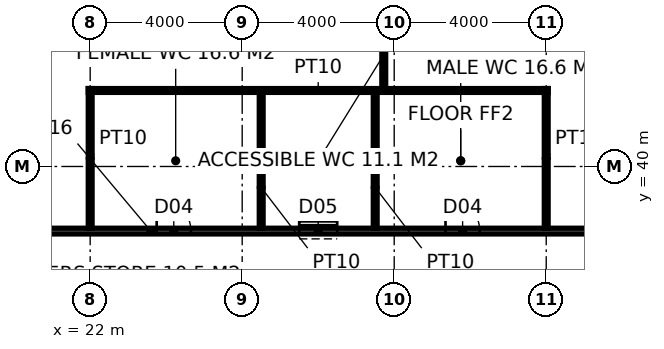
"""IFC4 building model, lengths in metres.
Left out: names, types, materials, properties, quantities, classifications, styles, units other than length and angle.
Written with IfcOpenShell. Run it as: python <this file> out.ifc"""

import sys

from ifc_helpers import new_model, si_unit, direction, frame, frame_2d, origin, place, context, subcontext, project, spatial, rectangle, extrude, element, fill, save


model = new_model("IFC4")
c1 = context("Model", 3, precision=1e-05, world=origin(), true_north=direction((0.0, 1.0)))
c2 = subcontext(c1, "Body", "Model", "MODEL_VIEW")
j1 = project(units=[si_unit("LENGTHUNIT", "METRE"), si_unit("PLANEANGLEUNIT", "RADIAN")], contexts=[c1])
p1 = place(None, origin())
s1 = spatial("IfcSite", under=j1, at=p1, CompositionType="ELEMENT")
p2 = place(p1, origin())
s2 = spatial("IfcBuilding", under=s1, at=p2, CompositionType="ELEMENT")
p3 = place(p2, frame((0.0, 0.0, 159.8)))
s3 = spatial("IfcBuildingStorey", under=s2, at=p3, CompositionType="ELEMENT", Elevation=159.8)
p4 = place(p3, frame((17.5, 38.3, 0.0), z_axis=(0.0, 0.0, 1.0), x_axis=(1.0, 0.0, 0.0)))
e1 = element("IfcWall", 1, at=p4, inside=s3, PredefinedType="PARTITIONING", context=c2, shape_type="SweptSolid", body=[
    extrude(rectangle(XDim=20.325, YDim=0.15, at=frame_2d((10.163, 0.0))), origin(), (0.0, 0.0, 1.0), 3.85),
])
p5 = place(p4, frame((6.25, 0.0, 0.0)))
e2 = element("IfcOpeningElement", 2, at=p5, cuts=e1, PredefinedType="OPENING", context=c2, shape_type="SweptSolid", body=[
    extrude(rectangle(XDim=0.9, YDim=2.1, at=frame_2d((0.45, 1.05))), frame((0.0, 0.085, 0.0), z_axis=(0.0, -1.0, 0.0), x_axis=(1.0, 0.0, 0.0)), (0.0, 0.0, 1.0), 0.17),
])
p6 = place(p4, frame((10.0, 0.0, 0.0)))
e3 = element("IfcOpeningElement", 3, at=p6, cuts=e1, PredefinedType="OPENING", context=c2, shape_type="SweptSolid", body=[
    extrude(rectangle(XDim=1.0, YDim=2.1, at=frame_2d((0.5, 1.05))), frame((0.0, 0.085, 0.0), z_axis=(0.0, -1.0, 0.0), x_axis=(1.0, 0.0, 0.0)), (0.0, 0.0, 1.0), 0.17),
])
p7 = place(p4, frame((13.85, 0.0, 0.0)))
e4 = element("IfcOpeningElement", 4, at=p7, cuts=e1, PredefinedType="OPENING", context=c2, shape_type="SweptSolid", body=[
    extrude(rectangle(XDim=0.9, YDim=2.1, at=frame_2d((0.45, 1.05))), frame((0.0, 0.085, 0.0), z_axis=(0.0, -1.0, 0.0), x_axis=(1.0, 0.0, 0.0)), (0.0, 0.0, 1.0), 0.17),
])
for number, where, z_axis, x_axis in (
    (5, (22.0, 38.375, 0.0), (0.0, 0.0, 1.0), (0.0, 1.0, 0.0)),
    (6, (34.0, 38.375, 0.0), (0.0, 0.0, 1.0), (0.0, 1.0, 0.0)),
):
    element("IfcWall", number, at=place(p3, frame(where, z_axis=z_axis, x_axis=x_axis)), inside=s3, PredefinedType="PARTITIONING", context=c2, shape_type="SweptSolid", body=[
        extrude(rectangle(XDim=3.675, YDim=0.1, at=frame_2d((1.837, 0.0))), origin(), (0.0, 0.0, 1.0), 2.95),
    ])
p8 = place(p3, frame((21.95, 42.0, 0.0), z_axis=(0.0, 0.0, 1.0), x_axis=(1.0, 0.0, 0.0)))
e7 = element("IfcWall", 7, at=p8, inside=s3, PredefinedType="PARTITIONING", context=c2, shape_type="SweptSolid", body=[
    extrude(rectangle(XDim=12.1, YDim=0.1, at=frame_2d((6.05, 0.0))), origin(), (0.0, 0.0, 1.0), 3.85),
])
for number, where, z_axis, x_axis in (
    (8, (26.5, 38.375, 0.0), (0.0, 0.0, 1.0), (0.0, 1.0, 0.0)),
    (9, (29.5, 38.375, 0.0), (0.0, 0.0, 1.0), (0.0, 1.0, 0.0)),
):
    element("IfcWall", number, at=place(p3, frame(where, z_axis=z_axis, x_axis=x_axis)), inside=s3, PredefinedType="PARTITIONING", context=c2, shape_type="SweptSolid", body=[
        extrude(rectangle(XDim=3.575, YDim=0.1, at=frame_2d((1.788, 0.0))), origin(), (0.0, 0.0, 1.0), 3.85),
    ])
p9 = place(p3, frame((29.725, 51.7, 0.0), z_axis=(0.0, 0.0, 1.0), x_axis=(0.0, -1.0, 0.0)))
e10 = element("IfcWall", 10, at=p9, inside=s3, PredefinedType="PARTITIONING", context=c2, shape_type="SweptSolid", body=[
    extrude(rectangle(XDim=9.7, YDim=0.1, at=frame_2d((4.85, 0.0))), origin(), (0.0, 0.0, 1.0), 3.85),
])
p10 = place(p9, frame((4.35, 0.0, 0.0)))
e11 = element("IfcOpeningElement", 11, at=p10, cuts=e10, PredefinedType="OPENING", context=c2, shape_type="SweptSolid", body=[
    extrude(rectangle(XDim=1.0, YDim=2.2, at=frame_2d((0.5, 1.1))), frame((0.0, 0.06, 0.0), z_axis=(0.0, -1.0, 0.0), x_axis=(1.0, 0.0, 0.0)), (0.0, 0.0, 1.0), 0.12),
])
p11 = place(p5, origin())
e12 = element("IfcDoor", 12, at=p11, inside=s3, OperationType="SINGLE_SWING_LEFT", PredefinedType="DOOR", context=c2, shape_type="SweptSolid", body=[
    extrude(rectangle(XDim=0.9, YDim=2.1, at=frame_2d((0.45, 1.05))), frame((0.0, 0.025, 0.0), z_axis=(0.0, -1.0, 0.0), x_axis=(1.0, 0.0, 0.0)), (0.0, 0.0, 1.0), 0.05),
])
fill(e2, e12)
p12 = place(p6, origin())
e13 = element("IfcDoor", 13, at=p12, inside=s3, OperationType="SLIDING_TO_LEFT", PredefinedType="DOOR", context=c2, shape_type="SweptSolid", body=[
    extrude(rectangle(XDim=1.0, YDim=2.1, at=frame_2d((0.5, 1.05))), frame((0.0, 0.025, 0.0), z_axis=(0.0, -1.0, 0.0), x_axis=(1.0, 0.0, 0.0)), (0.0, 0.0, 1.0), 0.05),
])
fill(e3, e13)
p13 = place(p7, origin())
e14 = element("IfcDoor", 14, at=p13, inside=s3, OperationType="SINGLE_SWING_LEFT", PredefinedType="DOOR", context=c2, shape_type="SweptSolid", body=[
    extrude(rectangle(XDim=0.9, YDim=2.1, at=frame_2d((0.45, 1.05))), frame((0.0, 0.025, 0.0), z_axis=(0.0, -1.0, 0.0), x_axis=(1.0, 0.0, 0.0)), (0.0, 0.0, 1.0), 0.05),
])
fill(e4, e14)
save(model, sys.argv[1])
